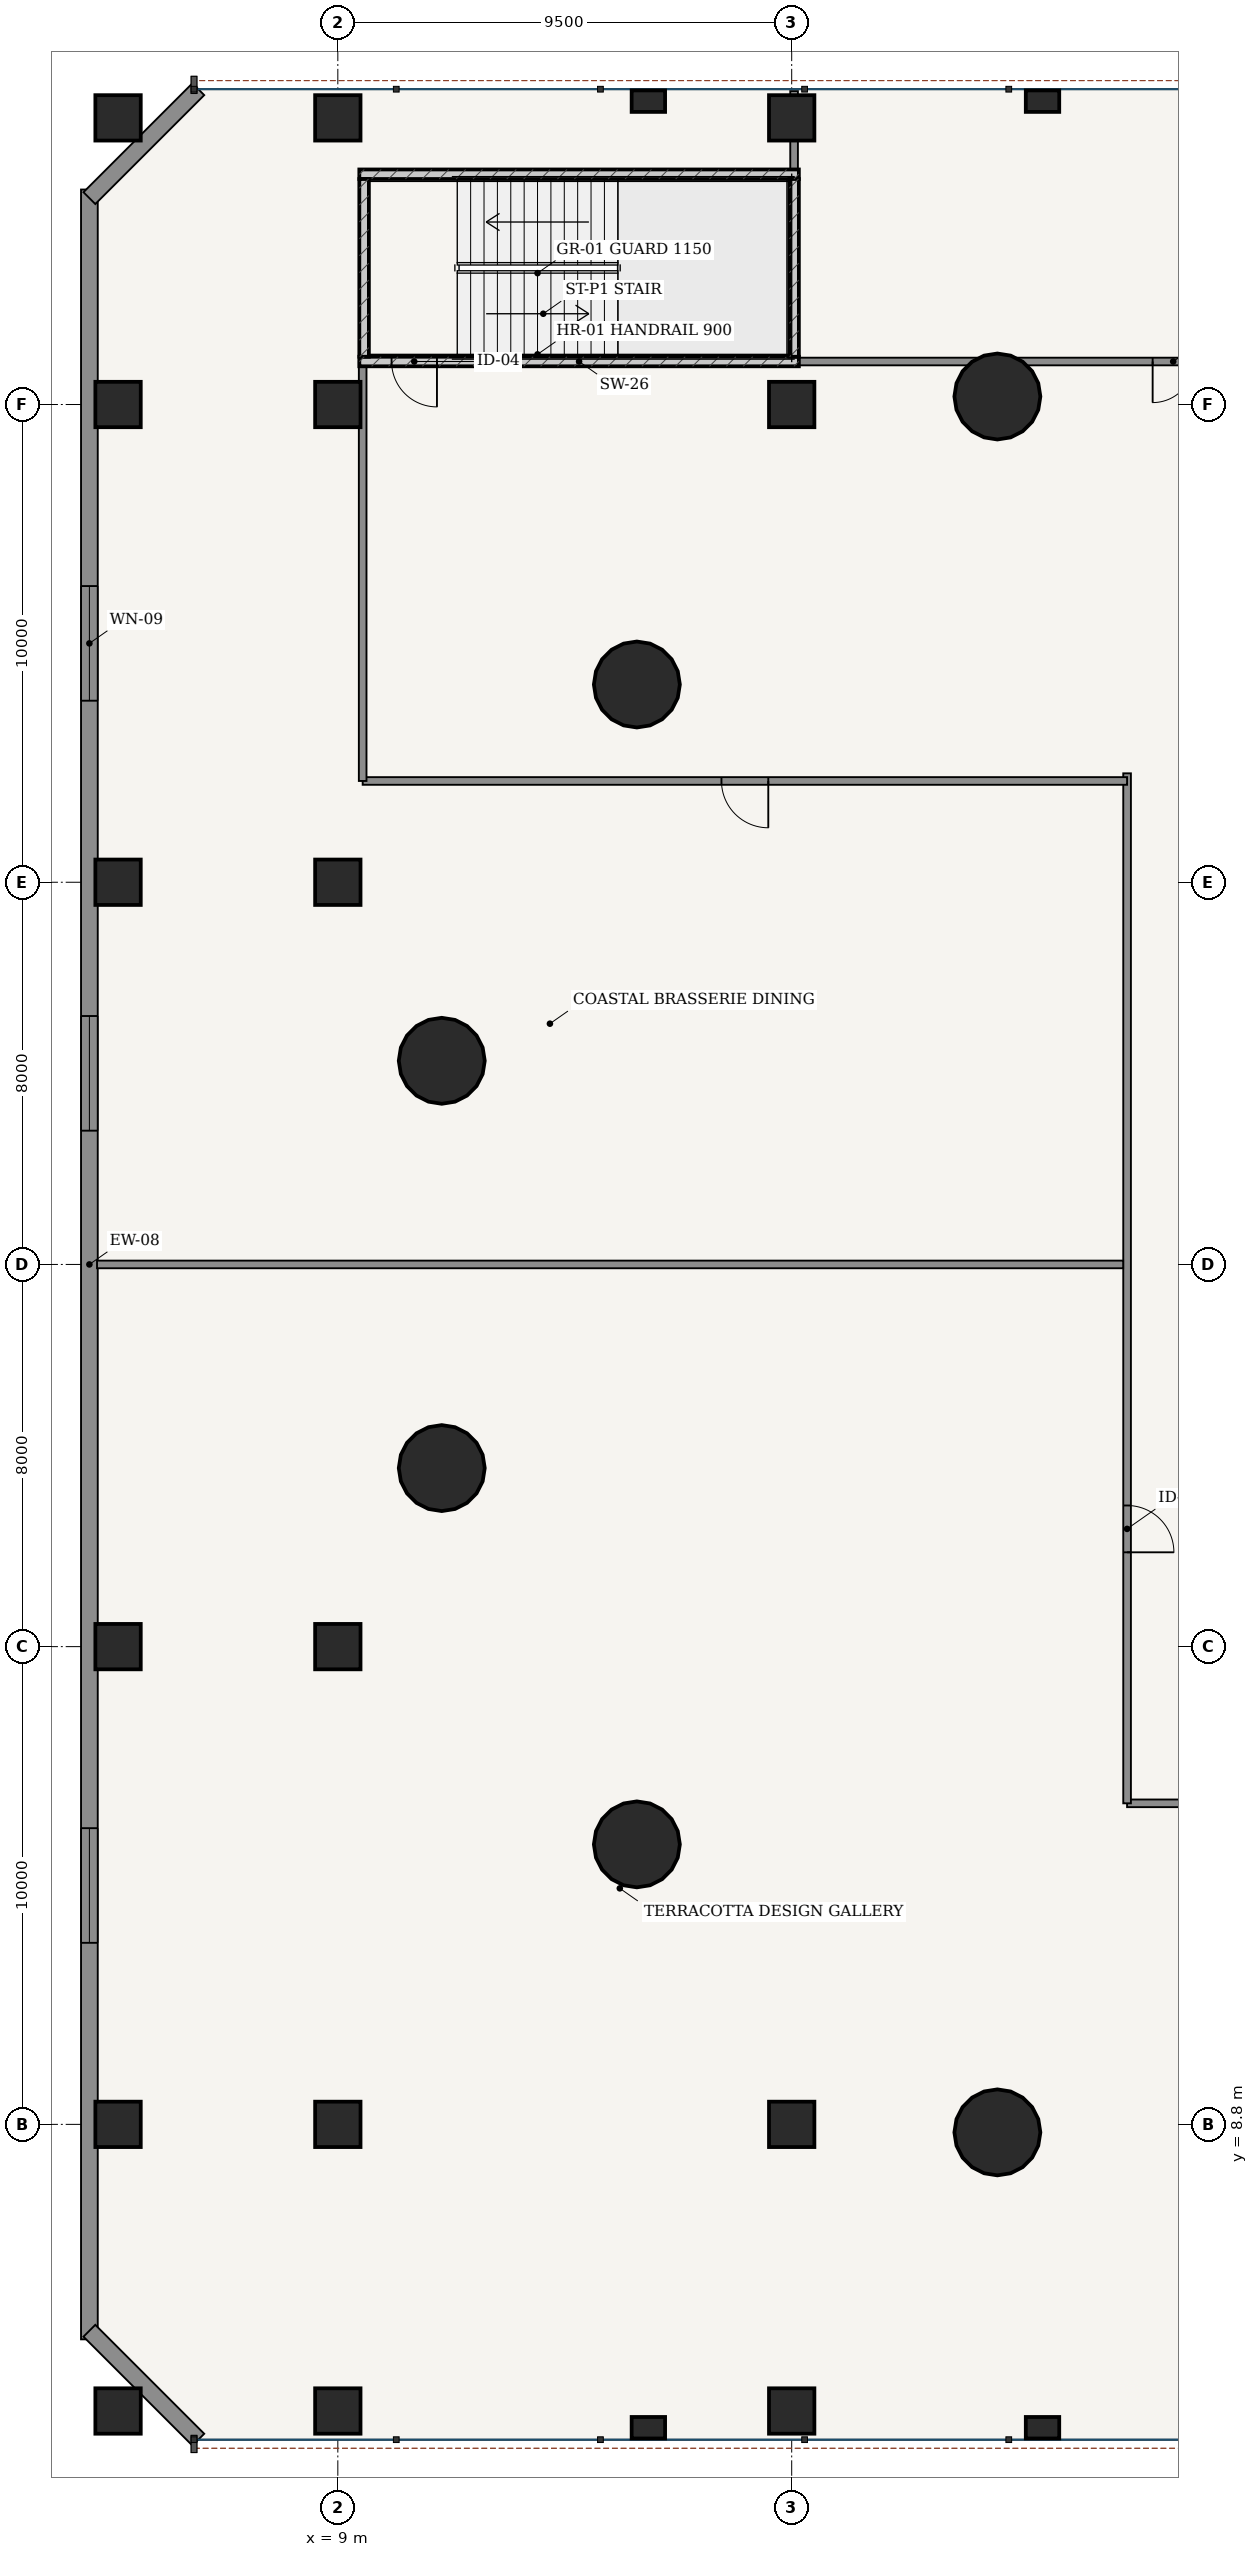
"""IFC4 building model, lengths in metres.
Left out: names, types, materials, properties, quantities, classifications, styles, units other than length and angle.
Written with IfcOpenShell. Run it as: python <this file> out.ifc"""

import sys

from ifc_helpers import new_model, si_unit, direction, frame, frame_2d, origin, origin_2d, place, context, subcontext, project, spatial, rectangle, hollow_circle, extrude, source, transform, mapped, element, fill, save


model = new_model("IFC4")
c1 = context("Model", 3, precision=1e-05, world=origin(), true_north=direction((-0.2419218956, 0.970295726276)))
c2 = subcontext(c1, "Body", "Model", "MODEL_VIEW")
j1 = project(units=[si_unit("LENGTHUNIT", "METRE"), si_unit("PLANEANGLEUNIT", "RADIAN")], contexts=[c1])
p1 = place(None, origin())
s1 = spatial("IfcSite", under=j1, at=p1, CompositionType="ELEMENT")
p2 = place(p1, origin())
s2 = spatial("IfcBuilding", under=s1, at=p2, CompositionType="ELEMENT")
p3 = place(p2, frame((0.0, 0.0, 5.4)))
s3 = spatial("IfcBuildingStorey", under=s2, at=p3, CompositionType="ELEMENT", Elevation=5.4)
p4 = place(p3, frame((9.45, 45.7, 0.0), z_axis=(0.0, 0.0, 1.0), x_axis=(1.0, 0.0, 0.0)))
e1 = element("IfcWall", 1, at=p4, inside=s3, PredefinedType="SOLIDWALL", context=c2, shape_type="SweptSolid", body=[
    extrude(rectangle(XDim=9.2, YDim=0.2, at=frame_2d((4.6, 0.0))), origin(), (0.0, 0.0, 1.0), 4.2),
])
p5 = place(p4, frame((0.675, 0.0, 0.0)))
e2 = element("IfcOpeningElement", 2, at=p5, cuts=e1, PredefinedType="OPENING", context=c2, shape_type="SweptSolid", body=[
    extrude(rectangle(XDim=0.95, YDim=2.15, at=frame_2d((0.475, 1.075))), frame((0.0, 0.11, 0.0), z_axis=(0.0, -1.0, 0.0), x_axis=(1.0, 0.0, 0.0)), (0.0, 0.0, 1.0), 0.22),
])
p6 = place(p3, frame((9.45, 49.62, 0.0), z_axis=(0.0, 0.0, 1.0), x_axis=(1.0, 0.0, 0.0)))
e3 = element("IfcWall", 3, at=p6, inside=s3, PredefinedType="SOLIDWALL", context=c2, shape_type="SweptSolid", body=[
    extrude(rectangle(XDim=9.2, YDim=0.2, at=frame_2d((4.6, 0.0))), origin(), (0.0, 0.0, 1.0), 4.2),
])
for number, where, z_axis, x_axis in (
    (4, (9.55, 45.8, 0.0), (0.0, 0.0, 1.0), (0.0, 1.0, 0.0)),
    (5, (18.55, 45.8, 0.0), (0.0, 0.0, 1.0), (0.0, 1.0, 0.0)),
):
    element("IfcWall", number, at=place(p3, frame(where, z_axis=z_axis, x_axis=x_axis)), inside=s3, PredefinedType="SOLIDWALL", context=c2, shape_type="SweptSolid", body=[
        extrude(rectangle(XDim=3.72, YDim=0.2, at=frame_2d((1.86, 0.0))), origin(), (0.0, 0.0, 1.0), 4.2),
    ])
for number, where, z_axis, x_axis in (
    (6, (22.805, 44.968, 0.0), (0.0, 0.0, 1.0), (1.0, 0.0, 0.0)),
    (7, (15.259, 38.939, 0.0), (0.0, 0.0, 1.0), (1.0, 0.0, 0.0)),
    (8, (11.176, 31.063, 0.0), (0.0, 0.0, 1.0), (1.0, 0.0, 0.0)),
    (9, (11.176, 22.537, 0.0), (0.0, 0.0, 1.0), (1.0, 0.0, 0.0)),
    (10, (15.259, 14.661, 0.0), (0.0, 0.0, 1.0), (1.0, 0.0, 0.0)),
    (11, (22.805, 8.632, 0.0), (0.0, 0.0, 1.0), (1.0, 0.0, 0.0)),
):
    element("IfcColumn", number, at=place(p3, frame(where, z_axis=z_axis, x_axis=x_axis)), inside=s3, PredefinedType="COLUMN", context=c2, shape_type="SweptSolid", body=[
        extrude(hollow_circle(Radius=0.9, WallThickness=0.055, at=origin_2d()), origin(), (0.0, 0.0, 1.0), 4.5),
    ])
for number, where, z_axis, x_axis in (
    (12, (4.4, 2.8, 0.0), (0.0, 0.0, 1.0), (1.0, 0.0, 0.0)),
    (13, (4.4, 8.8, 0.0), (0.0, 0.0, 1.0), (1.0, 0.0, 0.0)),
    (14, (4.4, 18.8, 0.0), (0.0, 0.0, 1.0), (1.0, 0.0, 0.0)),
    (15, (4.4, 34.8, 0.0), (0.0, 0.0, 1.0), (1.0, 0.0, 0.0)),
    (16, (4.4, 44.8, 0.0), (0.0, 0.0, 1.0), (1.0, 0.0, 0.0)),
    (17, (4.4, 50.8, 0.0), (0.0, 0.0, 1.0), (1.0, 0.0, 0.0)),
    (18, (9.0, 2.8, 0.0), (0.0, 0.0, 1.0), (1.0, 0.0, 0.0)),
    (19, (9.0, 8.8, 0.0), (0.0, 0.0, 1.0), (1.0, 0.0, 0.0)),
    (20, (9.0, 18.8, 0.0), (0.0, 0.0, 1.0), (1.0, 0.0, 0.0)),
    (21, (9.0, 34.8, 0.0), (0.0, 0.0, 1.0), (1.0, 0.0, 0.0)),
    (22, (9.0, 44.8, 0.0), (0.0, 0.0, 1.0), (1.0, 0.0, 0.0)),
    (23, (9.0, 50.8, 0.0), (0.0, 0.0, 1.0), (1.0, 0.0, 0.0)),
    (24, (18.5, 2.8, 0.0), (0.0, 0.0, 1.0), (1.0, 0.0, 0.0)),
    (25, (18.5, 8.8, 0.0), (0.0, 0.0, 1.0), (1.0, 0.0, 0.0)),
    (26, (18.5, 44.8, 0.0), (0.0, 0.0, 1.0), (1.0, 0.0, 0.0)),
    (27, (18.5, 50.8, 0.0), (0.0, 0.0, 1.0), (1.0, 0.0, 0.0)),
):
    element("IfcColumn", number, at=place(p3, frame(where, z_axis=z_axis, x_axis=x_axis)), inside=s3, PredefinedType="COLUMN", context=c2, shape_type="SweptSolid", body=[
        extrude(rectangle(XDim=0.95, YDim=0.95, at=origin_2d()), origin(), (0.0, 0.0, 1.0), 4.5),
    ])
for number, where, z_axis, x_axis in (
    (28, (15.5, 2.45, 0.0), (0.0, 0.0, 1.0), (1.0, 0.0, 0.0)),
    (29, (15.5, 51.15, 0.0), (0.0, 0.0, 1.0), (1.0, 0.0, 0.0)),
    (30, (23.75, 2.45, 0.0), (0.0, 0.0, 1.0), (1.0, 0.0, 0.0)),
    (31, (23.75, 51.15, 0.0), (0.0, 0.0, 1.0), (1.0, 0.0, 0.0)),
):
    element("IfcColumn", number, at=place(p3, frame(where, z_axis=z_axis, x_axis=x_axis)), inside=s3, PredefinedType="PILASTER", context=c2, shape_type="SweptSolid", body=[
        extrude(rectangle(XDim=0.7, YDim=0.45, at=origin_2d()), origin(), (0.0, 0.0, 1.0), 4.5),
    ])
p7 = place(p3, frame((3.8, 49.3, 0.0), z_axis=(0.0, 0.0, 1.0), x_axis=(0.0, -1.0, 0.0)))
e32 = element("IfcWall", 32, at=p7, inside=s3, PredefinedType="SOLIDWALL", context=c2, shape_type="SweptSolid", body=[
    extrude(rectangle(XDim=45.0, YDim=0.35, at=frame_2d((22.5, 0.0))), origin(), (0.0, 0.0, 1.0), 4.2),
])
p8 = place(p7, frame((8.3, 0.0, 0.85)))
e33 = element("IfcOpeningElement", 33, at=p8, cuts=e32, PredefinedType="OPENING", context=c2, shape_type="SweptSolid", body=[
    extrude(rectangle(XDim=2.4, YDim=2.2, at=frame_2d((1.2, 1.1))), frame((0.0, 0.185, 0.0), z_axis=(0.0, -1.0, 0.0), x_axis=(1.0, 0.0, 0.0)), (0.0, 0.0, 1.0), 0.37),
])
p9 = place(p7, frame((17.3, 0.0, 0.85)))
e34 = element("IfcOpeningElement", 34, at=p9, cuts=e32, PredefinedType="OPENING", context=c2, shape_type="SweptSolid", body=[
    extrude(rectangle(XDim=2.4, YDim=2.2, at=frame_2d((1.2, 1.1))), frame((0.0, 0.185, 0.0), z_axis=(0.0, -1.0, 0.0), x_axis=(1.0, 0.0, 0.0)), (0.0, 0.0, 1.0), 0.37),
])
p10 = place(p7, frame((34.3, 0.0, 0.85)))
e35 = element("IfcOpeningElement", 35, at=p10, cuts=e32, PredefinedType="OPENING", context=c2, shape_type="SweptSolid", body=[
    extrude(rectangle(XDim=2.4, YDim=2.2, at=frame_2d((1.2, 1.1))), frame((0.0, 0.185, 0.0), z_axis=(0.0, -1.0, 0.0), x_axis=(1.0, 0.0, 0.0)), (0.0, 0.0, 1.0), 0.37),
])
for number, where, z_axis, x_axis in (
    (36, (3.8, 4.48, 0.0), (0.0, 0.0, 1.0), (0.707, -0.707, 0.0)),
    (37, (6.08, 51.4, 0.0), (0.0, 0.0, 1.0), (-0.707, -0.707, 0.0)),
):
    element("IfcWall", number, at=place(p3, frame(where, z_axis=z_axis, x_axis=x_axis)), inside=s3, PredefinedType="SOLIDWALL", context=c2, shape_type="SweptSolid", body=[
        extrude(rectangle(XDim=3.224, YDim=0.35, at=frame_2d((1.612, 0.0))), origin(), (0.0, 0.0, 1.0), 3.235),
    ])
p11 = place(p3, frame((25.52, 15.52, 0.0), z_axis=(0.0, 0.0, 1.0), x_axis=(1.0, 0.0, 0.0)))
e38 = element("IfcWall", 38, at=p11, inside=s3, PredefinedType="PARTITIONING", context=c2, shape_type="SweptSolid", body=[
    extrude(rectangle(XDim=24.96, YDim=0.16, at=frame_2d((12.48, 0.0))), origin(), (0.0, 0.0, 1.0), 3.55),
])
p12 = place(p11, frame((5.854, 0.0, 0.0)))
e39 = element("IfcOpeningElement", 39, at=p12, cuts=e38, PredefinedType="OPENING", context=c2, shape_type="SweptSolid", body=[
    extrude(rectangle(XDim=0.98, YDim=2.2, at=frame_2d((0.49, 1.1))), frame((0.0, 0.09, 0.0), z_axis=(0.0, -1.0, 0.0), x_axis=(1.0, 0.0, 0.0)), (0.0, 0.0, 1.0), 0.18),
])
p13 = place(p11, frame((18.125, 0.0, 0.0)))
e40 = element("IfcOpeningElement", 40, at=p13, cuts=e38, PredefinedType="OPENING", context=c2, shape_type="SweptSolid", body=[
    extrude(rectangle(XDim=0.98, YDim=2.2, at=frame_2d((0.49, 1.1))), frame((0.0, 0.09, 0.0), z_axis=(0.0, -1.0, 0.0), x_axis=(1.0, 0.0, 0.0)), (0.0, 0.0, 1.0), 0.18),
])
p14 = place(p3, frame((25.52, 15.52, 0.0), z_axis=(0.0, 0.0, 1.0), x_axis=(0.0, 1.0, 0.0)))
e41 = element("IfcWall", 41, at=p14, inside=s3, PredefinedType="PARTITIONING", context=c2, shape_type="SweptSolid", body=[
    extrude(rectangle(XDim=21.56, YDim=0.16, at=frame_2d((10.78, 0.0))), origin(), (0.0, 0.0, 1.0), 3.55),
])
p15 = place(p14, frame((5.254, 0.0, 0.0)))
e42 = element("IfcOpeningElement", 42, at=p15, cuts=e41, PredefinedType="OPENING", context=c2, shape_type="SweptSolid", body=[
    extrude(rectangle(XDim=0.98, YDim=2.2, at=frame_2d((0.49, 1.1))), frame((0.0, 0.09, 0.0), z_axis=(0.0, -1.0, 0.0), x_axis=(1.0, 0.0, 0.0)), (0.0, 0.0, 1.0), 0.18),
])
p16 = place(p3, frame((9.52, 36.92, 0.0), z_axis=(0.0, 0.0, 1.0), x_axis=(1.0, 0.0, 0.0)))
e43 = element("IfcWall", 43, at=p16, inside=s3, PredefinedType="PARTITIONING", context=c2, shape_type="SweptSolid", body=[
    extrude(rectangle(XDim=16.0, YDim=0.16, at=frame_2d((8.0, 0.0))), origin(), (0.0, 0.0, 1.0), 3.55),
])
p17 = place(p16, frame((7.51, 0.0, 0.0)))
e44 = element("IfcOpeningElement", 44, at=p17, cuts=e43, PredefinedType="OPENING", context=c2, shape_type="SweptSolid", body=[
    extrude(rectangle(XDim=0.98, YDim=2.2, at=frame_2d((0.49, 1.1))), frame((0.0, 0.09, 0.0), z_axis=(0.0, -1.0, 0.0), x_axis=(1.0, 0.0, 0.0)), (0.0, 0.0, 1.0), 0.18),
])
p18 = place(p3, frame((9.52, 36.92, 0.0), z_axis=(0.0, 0.0, 1.0), x_axis=(0.0, 1.0, 0.0)))
e45 = element("IfcWall", 45, at=p18, inside=s3, PredefinedType="PARTITIONING", context=c2, shape_type="SweptSolid", body=[
    extrude(rectangle(XDim=8.78, YDim=0.16, at=frame_2d((4.39, 0.0))), origin(), (0.0, 0.0, 1.0), 3.569),
])
p19 = place(p3, frame((18.55, 45.7, 0.0), z_axis=(0.0, 0.0, 1.0), x_axis=(1.0, 0.0, 0.0)))
e46 = element("IfcWall", 46, at=p19, inside=s3, PredefinedType="PARTITIONING", context=c2, shape_type="SweptSolid", body=[
    extrude(rectangle(XDim=38.9, YDim=0.16, at=frame_2d((19.45, 0.0))), origin(), (0.0, 0.0, 1.0), 3.55),
])
p20 = place(p19, frame((7.505, 0.0, 0.0)))
e47 = element("IfcOpeningElement", 47, at=p20, cuts=e46, PredefinedType="OPENING", context=c2, shape_type="SweptSolid", body=[
    extrude(rectangle(XDim=0.86, YDim=2.1, at=frame_2d((0.43, 1.05))), frame((0.0, 0.09, 0.0), z_axis=(0.0, -1.0, 0.0), x_axis=(1.0, 0.0, 0.0)), (0.0, 0.0, 1.0), 0.18),
])
p21 = place(p19, frame((19.02, 0.0, 0.0)))
e48 = element("IfcOpeningElement", 48, at=p21, cuts=e46, PredefinedType="OPENING", context=c2, shape_type="SweptSolid", body=[
    extrude(rectangle(XDim=0.86, YDim=2.1, at=frame_2d((0.43, 1.05))), frame((0.0, 0.09, 0.0), z_axis=(0.0, -1.0, 0.0), x_axis=(1.0, 0.0, 0.0)), (0.0, 0.0, 1.0), 0.18),
])
p22 = place(p19, frame((30.475, 0.0, 0.0)))
e49 = element("IfcOpeningElement", 49, at=p22, cuts=e46, PredefinedType="OPENING", context=c2, shape_type="SweptSolid", body=[
    extrude(rectangle(XDim=0.98, YDim=2.2, at=frame_2d((0.49, 1.1))), frame((0.0, 0.09, 0.0), z_axis=(0.0, -1.0, 0.0), x_axis=(1.0, 0.0, 0.0)), (0.0, 0.0, 1.0), 0.18),
])
p23 = place(p3, frame((3.96, 26.8, 0.0), z_axis=(0.0, 0.0, 1.0), x_axis=(1.0, 0.0, 0.0)))
e50 = element("IfcWall", 50, at=p23, inside=s3, PredefinedType="PARTITIONING", context=c2, shape_type="SweptSolid", body=[
    extrude(rectangle(XDim=21.478, YDim=0.16, at=frame_2d((10.739, 0.0))), origin(), (0.0, 0.0, 1.0), 3.642),
])
p24 = place(p3, frame((18.55, 49.722, 0.0), z_axis=(0.0, 0.0, 1.0), x_axis=(0.0, 1.0, 0.0)))
e51 = element("IfcWall", 51, at=p24, inside=s3, PredefinedType="PARTITIONING", context=c2, shape_type="SweptSolid", body=[
    extrude(rectangle(XDim=1.638, YDim=0.16, at=frame_2d((0.819, 0.0))), origin(), (0.0, 0.0, 1.0), 3.235),
])
m1 = source(origin(), c2, "Body", "SweptSolid", [
    extrude(rectangle(XDim=2.4, YDim=2.2, at=frame_2d((1.2, 1.1))), frame((0.0, 0.03, 0.0), z_axis=(0.0, -1.0, 0.0), x_axis=(1.0, 0.0, 0.0)), (0.0, 0.0, 1.0), 0.06),
])
p25 = place(p8, origin())
e52 = element("IfcWindow", 52, at=p25, inside=s3, PartitioningType="SINGLE_PANEL", PredefinedType="WINDOW", context=c2, shape_type="MappedRepresentation", body=[
    mapped(m1, transform((0.0, 0.0, 0.0), scale=1.0)),
])
fill(e33, e52)
p26 = place(p9, origin())
e53 = element("IfcWindow", 53, at=p26, inside=s3, PartitioningType="SINGLE_PANEL", PredefinedType="WINDOW", context=c2, shape_type="MappedRepresentation", body=[
    mapped(m1, transform((0.0, 0.0, 0.0), scale=1.0)),
])
fill(e34, e53)
p27 = place(p10, origin())
e54 = element("IfcWindow", 54, at=p27, inside=s3, PartitioningType="SINGLE_PANEL", PredefinedType="WINDOW", context=c2, shape_type="MappedRepresentation", body=[
    mapped(m1, transform((0.0, 0.0, 0.0), scale=1.0)),
])
fill(e35, e54)
m2 = source(origin(), c2, "Body", "SweptSolid", [
    extrude(rectangle(XDim=0.95, YDim=2.15, at=frame_2d((0.475, 1.075))), frame((0.0, 0.025, 0.0), z_axis=(0.0, -1.0, 0.0), x_axis=(1.0, 0.0, 0.0)), (0.0, 0.0, 1.0), 0.05),
])
p28 = place(p5, frame((0.95, 0.0, 0.0), z_axis=(0.0, 0.0, 1.0), x_axis=(-1.0, 0.0, 0.0)))
e55 = element("IfcDoor", 55, at=p28, inside=s3, OperationType="SINGLE_SWING_LEFT", PredefinedType="DOOR", context=c2, shape_type="MappedRepresentation", body=[
    mapped(m2, transform((0.0, 0.0, 0.0), scale=1.0)),
])
fill(e2, e55)
m3 = source(origin(), c2, "Body", "SweptSolid", [
    extrude(rectangle(XDim=0.98, YDim=2.2, at=frame_2d((0.49, 1.1))), frame((0.0, 0.025, 0.0), z_axis=(0.0, -1.0, 0.0), x_axis=(1.0, 0.0, 0.0)), (0.0, 0.0, 1.0), 0.05),
])
p29 = place(p15, frame((0.98, 0.0, 0.0), z_axis=(0.0, 0.0, 1.0), x_axis=(-1.0, 0.0, 0.0)))
e56 = element("IfcDoor", 56, at=p29, inside=s3, OperationType="SINGLE_SWING_RIGHT", PredefinedType="DOOR", context=c2, shape_type="MappedRepresentation", body=[
    mapped(m3, transform((0.0, 0.0, 0.0), scale=1.0)),
])
fill(e42, e56)
p30 = place(p17, frame((0.98, 0.0, 0.0), z_axis=(0.0, 0.0, 1.0), x_axis=(-1.0, 0.0, 0.0)))
e57 = element("IfcDoor", 57, at=p30, inside=s3, OperationType="SINGLE_SWING_LEFT", PredefinedType="DOOR", context=c2, shape_type="MappedRepresentation", body=[
    mapped(m3, transform((0.0, 0.0, 0.0), scale=1.0)),
])
fill(e44, e57)
m4 = source(origin(), c2, "Body", "SweptSolid", [
    extrude(rectangle(XDim=0.86, YDim=2.1, at=frame_2d((0.43, 1.05))), frame((0.0, 0.025, 0.0), z_axis=(0.0, -1.0, 0.0), x_axis=(1.0, 0.0, 0.0)), (0.0, 0.0, 1.0), 0.05),
])
p31 = place(p20, frame((0.86, 0.0, 0.0), z_axis=(0.0, 0.0, 1.0), x_axis=(-1.0, 0.0, 0.0)))
e58 = element("IfcDoor", 58, at=p31, inside=s3, OperationType="SINGLE_SWING_RIGHT", PredefinedType="DOOR", context=c2, shape_type="MappedRepresentation", body=[
    mapped(m4, transform((0.0, 0.0, 0.0), scale=1.0)),
])
fill(e47, e58)
save(model, sys.argv[1])
